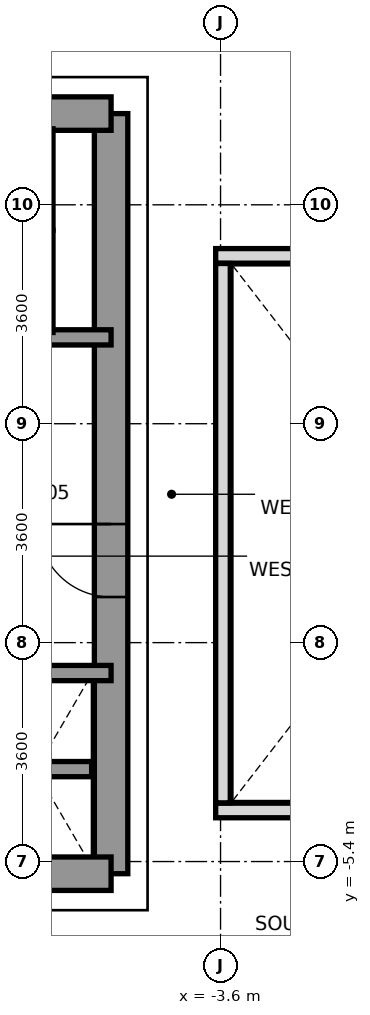
"""IFC4 building model, lengths in metres.
Left out: names, types, materials, properties, quantities, classifications, styles, units other than length and angle.
Written with IfcOpenShell. Run it as: python <this file> out.ifc"""

import sys

from ifc_helpers import new_model, si_unit, direction, frame, frame_2d, origin, place, context, subcontext, project, spatial, rectangle, extrude, source, transform, mapped, element, fill, save


model = new_model("IFC4")
c1 = context("Model", 3, precision=1e-05, world=origin(), true_north=direction((0.0, 1.0)))
c2 = subcontext(c1, "Body", "Model", "MODEL_VIEW")
j1 = project(units=[si_unit("LENGTHUNIT", "METRE"), si_unit("PLANEANGLEUNIT", "RADIAN")], contexts=[c1])
p1 = place(None, origin())
s1 = spatial("IfcSite", under=j1, at=p1, CompositionType="ELEMENT")
p2 = place(p1, origin())
s2 = spatial("IfcBuilding", under=s1, at=p2, CompositionType="ELEMENT")
p3 = place(p2, frame((0.0, 0.0, 68.0)))
s3 = spatial("IfcBuildingStorey", under=s2, at=p3, CompositionType="ELEMENT", Elevation=68.0)
p4 = place(p3, frame((-5.4, -5.6, 0.0), z_axis=(0.0, 0.0, 1.0), x_axis=(0.0, 1.0, 0.0)))
e1 = element("IfcWall", 1, at=p4, inside=s3, PredefinedType="SHEAR", context=c2, shape_type="SweptSolid", body=[
    extrude(rectangle(XDim=12.5, YDim=0.55, at=frame_2d((6.25, 0.0))), origin(), (0.0, 0.0, 1.0), 3.2),
])
p5 = place(p4, frame((4.55, 0.0, 0.0)))
e2 = element("IfcOpeningElement", 2, at=p5, cuts=e1, PredefinedType="OPENING", context=c2, shape_type="SweptSolid", body=[
    extrude(rectangle(XDim=1.2, YDim=2.2, at=frame_2d((0.6, 1.1))), frame((0.0, 0.285, 0.0), z_axis=(0.0, -1.0, 0.0), x_axis=(1.0, 0.0, 0.0)), (0.0, 0.0, 1.0), 0.57),
])
p6 = place(p3, frame((-11.381, 6.9, 0.0), z_axis=(0.0, 0.0, 1.0), x_axis=(1.0, 0.0, 0.0)))
e3 = element("IfcWall", 3, at=p6, inside=s3, PredefinedType="SHEAR", context=c2, shape_type="SweptSolid", body=[
    extrude(rectangle(XDim=5.981, YDim=0.55, at=frame_2d((2.991, 0.0))), origin(), (0.0, 0.0, 1.0), 3.2),
])
p7 = place(p3, frame((-13.2, -5.6, 0.0), z_axis=(0.0, 0.0, 1.0), x_axis=(1.0, 0.0, 0.0)))
e4 = element("IfcWall", 4, at=p7, inside=s3, PredefinedType="SHEAR", context=c2, shape_type="SweptSolid", body=[
    extrude(rectangle(XDim=7.8, YDim=0.55, at=frame_2d((3.9, 0.0))), origin(), (0.0, 0.0, 1.0), 3.2),
])
p8 = place(p7, frame((3.6, 0.0, 0.0)))
e5 = element("IfcOpeningElement", 5, at=p8, cuts=e4, PredefinedType="OPENING", context=c2, shape_type="SweptSolid", body=[
    extrude(rectangle(XDim=1.2, YDim=2.2, at=frame_2d((0.6, 1.1))), frame((0.0, 0.285, 0.0), z_axis=(0.0, -1.0, 0.0), x_axis=(1.0, 0.0, 0.0)), (0.0, 0.0, 1.0), 0.57),
])
p9 = place(p3, frame((-8.18, 3.22, 0.0), z_axis=(0.0, 0.0, 1.0), x_axis=(1.0, 0.0, 0.0)))
e6 = element("IfcWall", 6, at=p9, inside=s3, PredefinedType="SOLIDWALL", context=c2, shape_type="SweptSolid", body=[
    extrude(rectangle(XDim=2.78, YDim=0.25, at=frame_2d((1.39, 0.0))), origin(), (0.0, 0.0, 1.0), 3.2),
])
p10 = place(p3, frame((-8.48, -2.3, 0.0), z_axis=(0.0, 0.0, 1.0), x_axis=(1.0, 0.0, 0.0)))
e7 = element("IfcWall", 7, at=p10, inside=s3, PredefinedType="SOLIDWALL", context=c2, shape_type="SweptSolid", body=[
    extrude(rectangle(XDim=3.08, YDim=0.25, at=frame_2d((1.54, 0.0))), origin(), (0.0, 0.0, 1.0), 3.2),
])
p11 = place(p3, frame((-7.56, -3.88, 0.0), z_axis=(0.0, 0.0, 1.0), x_axis=(1.0, 0.0, 0.0)))
e8 = element("IfcWall", 8, at=p11, inside=s3, PredefinedType="SOLIDWALL", context=c2, shape_type="SweptSolid", body=[
    extrude(rectangle(XDim=1.84, YDim=0.25, at=frame_2d((0.92, 0.0))), origin(), (0.0, 0.0, 1.0), 3.2),
])
p12 = place(p3, frame((-6.48, 3.3, 0.0), z_axis=(0.0, 0.0, 1.0), x_axis=(0.0, 1.0, 0.0)))
e9 = element("IfcWall", 9, at=p12, inside=s3, PredefinedType="SOLIDWALL", context=c2, shape_type="SweptSolid", body=[
    extrude(rectangle(XDim=1.68, YDim=0.25, at=frame_2d((0.84, 0.0))), origin(), (0.0, 0.0, 1.0), 3.2),
])
p13 = place(p3, frame((-6.48, 4.98, 0.0), z_axis=(0.0, 0.0, 1.0), x_axis=(0.0, 1.0, 0.0)))
e10 = element("IfcWall", 10, at=p13, inside=s3, PredefinedType="SOLIDWALL", context=c2, shape_type="SweptSolid", body=[
    extrude(rectangle(XDim=1.67, YDim=0.25, at=frame_2d((0.835, 0.0))), origin(), (0.0, 0.0, 1.0), 3.2),
])
for number, where, z_axis, x_axis in (
    (11, (-3.68, -4.56, 0.0), (0.0, 0.0, 1.0), (1.0, 0.0, 0.0)),
    (12, (-3.68, 4.56, 0.0), (0.0, 0.0, 1.0), (1.0, 0.0, 0.0)),
):
    element("IfcWall", number, at=place(p3, frame(where, z_axis=z_axis, x_axis=x_axis)), inside=s3, PredefinedType="PARAPET", context=c2, shape_type="SweptSolid", body=[
        extrude(rectangle(XDim=7.36, YDim=0.24, at=frame_2d((3.68, 0.0))), origin(), (0.0, 0.0, 1.0), 1.15),
    ])
p14 = place(p3, frame((-3.56, -4.435, 0.0), z_axis=(0.0, 0.0, 1.0), x_axis=(0.0, 1.0, 0.0)))
e13 = element("IfcWall", 13, at=p14, inside=s3, PredefinedType="PARAPET", context=c2, shape_type="SweptSolid", body=[
    extrude(rectangle(XDim=8.87, YDim=0.24, at=frame_2d((4.435, 0.0))), origin(), (0.0, 0.0, 1.0), 1.15),
])
m1 = source(origin(), c2, "Body", "SweptSolid", [
    extrude(rectangle(XDim=1.2, YDim=2.2, at=frame_2d((0.6, 1.1))), frame((0.0, 0.025, 0.0), z_axis=(0.0, -1.0, 0.0), x_axis=(1.0, 0.0, 0.0)), (0.0, 0.0, 1.0), 0.05),
])
p15 = place(p5, origin())
e14 = element("IfcDoor", 14, at=p15, inside=s3, OperationType="SINGLE_SWING_RIGHT", PredefinedType="DOOR", context=c2, shape_type="MappedRepresentation", body=[
    mapped(m1, transform((0.0, 0.0, 0.0), x_axis=(1.0, 0.0, 0.0), y_axis=(0.0, 1.0, 0.0), z_axis=(0.0, 0.0, 1.0), scale=1.0)),
])
fill(e2, e14)
save(model, sys.argv[1])
